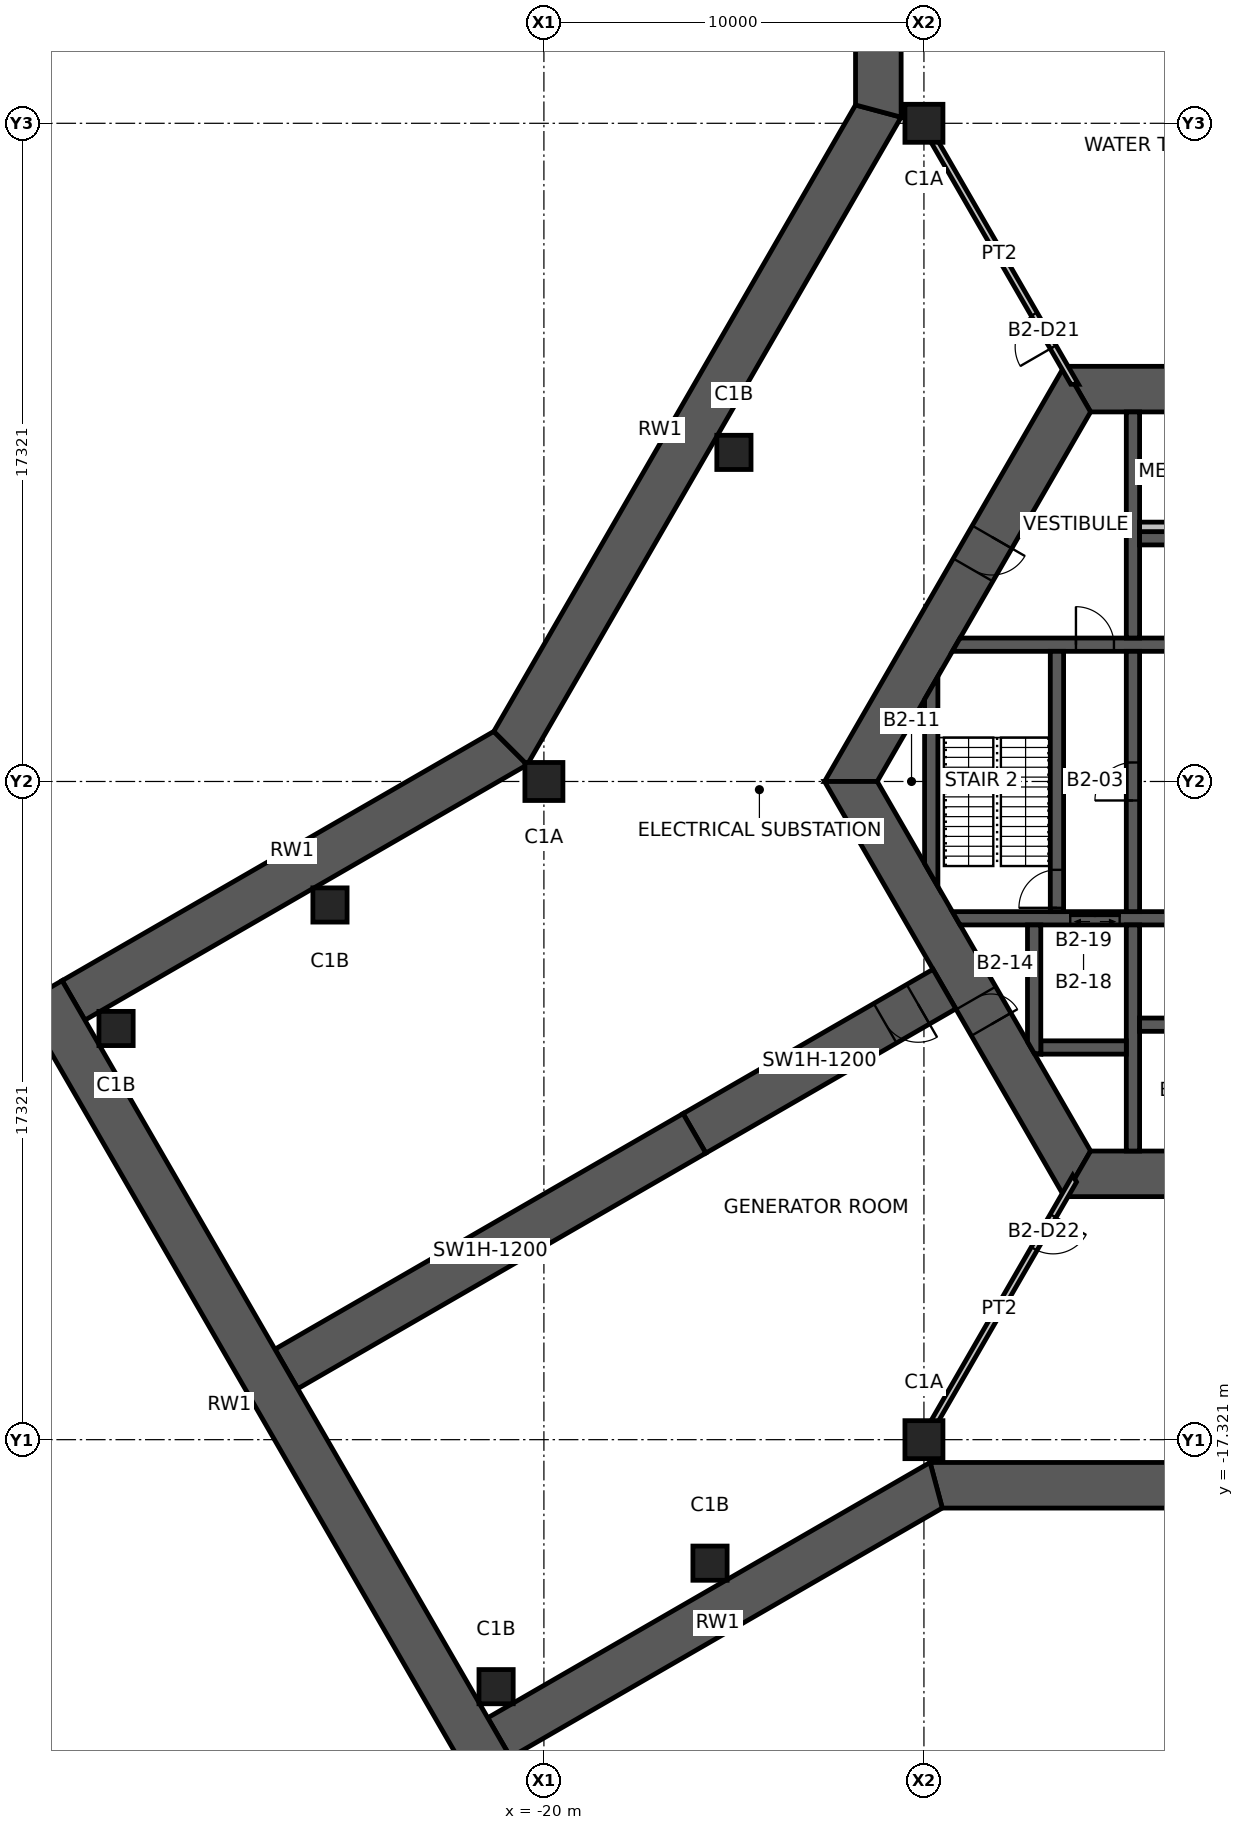
"""IFC4 building model, lengths in metres.
Left out: names, types, materials, properties, quantities, classifications, styles, units other than length and angle.
Written with IfcOpenShell. Run it as: python <this file> out.ifc"""

import sys

from ifc_helpers import new_model, si_unit, direction, frame, frame_2d, origin, origin_2d, place, context, subcontext, project, spatial, polyline, rectangle, hollow_rectangle, outline, extrude, element, fill, save


model = new_model("IFC4")
c1 = context("Model", 3, precision=1e-05, world=origin(), true_north=direction((0.0, 1.0)))
c2 = subcontext(c1, "Body", "Model", "MODEL_VIEW")
j1 = project(units=[si_unit("LENGTHUNIT", "METRE"), si_unit("PLANEANGLEUNIT", "RADIAN")], contexts=[c1])
p1 = place(None, origin())
s1 = spatial("IfcSite", under=j1, at=p1, CompositionType="ELEMENT")
p2 = place(p1, origin())
s2 = spatial("IfcBuilding", under=s1, at=p2, CompositionType="ELEMENT")
p3 = place(p2, frame((0.0, 0.0, -10.0)))
s3 = spatial("IfcBuildingStorey", under=s2, at=p3, CompositionType="ELEMENT", Elevation=-10.0)
for number, where, z_axis, x_axis in (
    (1, (-10.0, 17.321, -1.2), (0.0, 0.0, 1.0), (1.0, 0.0, 0.0)),
    (2, (-20.0, 0.0, -1.2), (0.0, 0.0, 1.0), (1.0, 0.0, 0.0)),
    (3, (-10.0, -17.321, -1.2), (0.0, 0.0, 1.0), (1.0, 0.0, 0.0)),
):
    element("IfcColumn", number, at=place(p3, frame(where, z_axis=z_axis, x_axis=x_axis)), inside=s3, PredefinedType="COLUMN", context=c2, shape_type="SweptSolid", body=[
        extrude(hollow_rectangle(XDim=1.0, YDim=1.0, WallThickness=0.06, at=origin_2d()), origin(), (0.0, 0.0, 1.0), 6.2),
    ])
for number, where, z_axis, x_axis in (
    (4, (-15.0, 8.66, -1.2), (0.0, 0.0, 1.0), (1.0, 0.0, 0.0)),
    (5, (-25.629, -3.25, -1.2), (0.0, 0.0, 1.0), (1.0, 0.0, 0.0)),
    (6, (-31.258, -6.5, -1.2), (0.0, 0.0, 1.0), (1.0, 0.0, 0.0)),
    (7, (-15.629, -20.571, -1.2), (0.0, 0.0, 1.0), (1.0, 0.0, 0.0)),
    (8, (-21.258, -23.821, -1.2), (0.0, 0.0, 1.0), (1.0, 0.0, 0.0)),
):
    element("IfcColumn", number, at=place(p3, frame(where, z_axis=z_axis, x_axis=x_axis)), inside=s3, PredefinedType="COLUMN", context=c2, shape_type="SweptSolid", body=[
        extrude(hollow_rectangle(XDim=0.9, YDim=0.9, WallThickness=0.05, at=origin_2d()), origin(), (0.0, 0.0, 1.0), 6.2),
    ])
p4 = place(p3, frame((5.961, 10.325, 0.0), z_axis=(0.0, 0.0, 1.0), x_axis=(-1.0, 0.0, 0.0)))
e9 = element("IfcWall", 9, at=p4, inside=s3, PredefinedType="SHEAR", context=c2, shape_type="SweptSolid", body=[
    extrude(outline(polyline([(-0.346, -0.6), (4.574, -0.6), (5.374, -0.6), (6.549, -0.6), (7.349, -0.6), (12.269, -0.6), (11.576, 0.6), (7.349, 0.6), (6.549, 0.6), (5.374, 0.6), (4.574, 0.6), (0.346, 0.6), (-0.346, -0.6)])), origin(), (0.0, 0.0, 1.0), 5.0),
])
p5 = place(p4, frame((6.549, 0.0, 0.0)))
e10 = element("IfcOpeningElement", 10, at=p5, cuts=e9, PredefinedType="OPENING", context=c2, shape_type="SweptSolid", body=[
    extrude(rectangle(XDim=0.8, YDim=2.1, at=frame_2d((0.4, 1.05))), frame((0.0, 0.61, 0.0), z_axis=(0.0, -1.0, 0.0), x_axis=(1.0, 0.0, 0.0)), (0.0, 0.0, 1.0), 1.22),
])
p6 = place(p4, frame((4.574, 0.0, 0.0)))
e11 = element("IfcOpeningElement", 11, at=p6, cuts=e9, PredefinedType="OPENING", context=c2, shape_type="SweptSolid", body=[
    extrude(rectangle(XDim=0.8, YDim=2.1, at=frame_2d((0.4, 1.05))), frame((0.0, 0.61, 0.0), z_axis=(0.0, -1.0, 0.0), x_axis=(1.0, 0.0, 0.0)), (0.0, 0.0, 1.0), 1.22),
])
p7 = place(p3, frame((-5.961, 10.325, 0.0), z_axis=(0.0, 0.0, 1.0), x_axis=(-0.500004296715, -0.866022923061, 0.0)))
e12 = element("IfcWall", 12, at=p7, inside=s3, PredefinedType="SHEAR", context=c2, shape_type="SweptSolid", body=[
    extrude(outline(polyline([(-0.346, -0.6), (4.494, -0.6), (5.494, -0.6), (12.269, -0.6), (11.576, 0.6), (5.494, 0.6), (4.494, 0.6), (0.346, 0.6), (-0.346, -0.6)])), origin(), (0.0, 0.0, 1.0), 5.0),
])
p8 = place(p7, frame((4.494, 0.0, 0.0)))
e13 = element("IfcOpeningElement", 13, at=p8, cuts=e12, PredefinedType="OPENING", context=c2, shape_type="SweptSolid", body=[
    extrude(rectangle(XDim=1.0, YDim=2.1, at=frame_2d((0.5, 1.05))), frame((0.0, 0.61, 0.0), z_axis=(0.0, -1.0, 0.0), x_axis=(1.0, 0.0, 0.0)), (0.0, 0.0, 1.0), 1.22),
])
p9 = place(p3, frame((-11.922, 0.0, 0.0), z_axis=(0.0, 0.0, 1.0), x_axis=(0.500004296715, -0.866022923061, 0.0)))
e14 = element("IfcWall", 14, at=p9, inside=s3, PredefinedType="SHEAR", context=c2, shape_type="SweptSolid", body=[
    extrude(outline(polyline([(-0.346, -0.6), (6.581, -0.6), (7.381, -0.6), (12.269, -0.6), (11.576, 0.6), (7.381, 0.6), (6.581, 0.6), (0.346, 0.6), (-0.346, -0.6)])), origin(), (0.0, 0.0, 1.0), 5.0),
])
p10 = place(p9, frame((6.581, 0.0, 0.0)))
e15 = element("IfcOpeningElement", 15, at=p10, cuts=e14, PredefinedType="OPENING", context=c2, shape_type="SweptSolid", body=[
    extrude(rectangle(XDim=0.8, YDim=2.1, at=frame_2d((0.4, 1.05))), frame((0.0, 0.61, 0.0), z_axis=(0.0, -1.0, 0.0), x_axis=(1.0, 0.0, 0.0)), (0.0, 0.0, 1.0), 1.22),
])
p11 = place(p3, frame((-5.961, -10.325, 0.0), z_axis=(0.0, 0.0, 1.0), x_axis=(1.0, 0.0, 0.0)))
e16 = element("IfcWall", 16, at=p11, inside=s3, PredefinedType="SHEAR", context=c2, shape_type="SweptSolid", body=[
    extrude(outline(polyline([(-0.346, -0.6), (5.461, -0.6), (6.461, -0.6), (12.269, -0.6), (11.576, 0.6), (6.461, 0.6), (5.461, 0.6), (0.346, 0.6), (-0.346, -0.6)])), origin(), (0.0, 0.0, 1.0), 5.0),
])
p12 = place(p11, frame((5.461, 0.0, 0.0)))
e17 = element("IfcOpeningElement", 17, at=p12, cuts=e16, PredefinedType="OPENING", context=c2, shape_type="SweptSolid", body=[
    extrude(rectangle(XDim=1.0, YDim=2.1, at=frame_2d((0.5, 1.05))), frame((0.0, 0.61, 0.0), z_axis=(0.0, -1.0, 0.0), x_axis=(1.0, 0.0, 0.0)), (0.0, 0.0, 1.0), 1.22),
])
p13 = place(p3, frame((-9.461, -5.462, 0.0), z_axis=(0.0, 0.0, 1.0), x_axis=(-0.866019116917, -0.500010889016, 0.0)))
e18 = element("IfcWall", 18, at=p13, inside=s3, PredefinedType="SHEAR", context=c2, shape_type="SweptSolid", body=[
    extrude(rectangle(XDim=7.595, YDim=1.2, at=frame_2d((3.798, 0.0))), origin(), (0.0, 0.0, 1.0), 5.0),
])
p14 = place(p13, frame((0.8, 0.0, 0.0)))
e19 = element("IfcOpeningElement", 19, at=p14, cuts=e18, PredefinedType="OPENING", context=c2, shape_type="SweptSolid", body=[
    extrude(rectangle(XDim=1.0, YDim=2.1, at=frame_2d((0.5, 1.05))), frame((0.0, 0.61, 0.0), z_axis=(0.0, -1.0, 0.0), x_axis=(1.0, 0.0, 0.0)), (0.0, 0.0, 1.0), 1.22),
])
p15 = place(p3, frame((-16.039, -9.26, 0.0), z_axis=(0.0, 0.0, 1.0), x_axis=(-0.866023285932, -0.50000366821, 0.0)))
e20 = element("IfcWall", 20, at=p15, inside=s3, PredefinedType="SHEAR", context=c2, shape_type="SweptSolid", body=[
    extrude(rectangle(XDim=12.4, YDim=1.2, at=frame_2d((6.2, 0.0))), origin(), (0.0, 0.0, 1.0), 5.0),
])
p16 = place(p3, frame((-32.378, -5.761, 0.0), z_axis=(0.0, 0.0, 1.0), x_axis=(0.866028209229, 0.499995140796, 0.0)))
e21 = element("IfcWall", 21, at=p16, inside=s3, PredefinedType="SOLIDWALL", context=c2, shape_type="SweptSolid", body=[
    extrude(outline(polyline([(0.0, -0.6), (13.439, -0.6), (13.118, 0.6), (0.0, 0.6), (0.0, -0.6)])), origin(), (0.0, 0.0, 1.0), 5.0),
])
p17 = place(p3, frame((-20.878, 0.878, 0.0), z_axis=(0.0, 0.0, 1.0), x_axis=(0.499998307868, 0.866026380735, 0.0)))
e22 = element("IfcWall", 22, at=p17, inside=s3, PredefinedType="SOLIDWALL", context=c2, shape_type="SweptSolid", body=[
    extrude(outline(polyline([(-0.161, -0.6), (19.518, -0.6), (19.196, 0.6), (0.161, 0.6), (-0.161, -0.6)])), origin(), (0.0, 0.0, 1.0), 5.0),
])
p18 = place(p3, frame((-11.2, 17.642, 0.0), z_axis=(0.0, 0.0, 1.0), x_axis=(0.0, 1.0, 0.0)))
e23 = element("IfcWall", 23, at=p18, inside=s3, PredefinedType="SOLIDWALL", context=c2, shape_type="SweptSolid", body=[
    extrude(outline(polyline([(-0.161, -0.6), (13.278, -0.6), (13.278, 0.6), (0.161, 0.6), (-0.161, -0.6)])), origin(), (0.0, 0.0, 1.0), 5.0),
])
p19 = place(p3, frame((9.678, -18.521, 0.0), z_axis=(0.0, 0.0, 1.0), x_axis=(-1.0, 0.0, 0.0)))
e24 = element("IfcWall", 24, at=p19, inside=s3, PredefinedType="SOLIDWALL", context=c2, shape_type="SweptSolid", body=[
    extrude(outline(polyline([(-0.161, -0.6), (19.518, -0.6), (19.196, 0.6), (0.161, 0.6), (-0.161, -0.6)])), origin(), (0.0, 0.0, 1.0), 5.0),
])
p20 = place(p3, frame((-9.678, -18.521, 0.0), z_axis=(0.0, 0.0, 1.0), x_axis=(-0.866028209229, -0.499995140796, 0.0)))
e25 = element("IfcWall", 25, at=p20, inside=s3, PredefinedType="SOLIDWALL", context=c2, shape_type="SweptSolid", body=[
    extrude(outline(polyline([(-0.161, -0.6), (13.279, -0.6), (13.279, 0.6), (0.161, 0.6), (-0.161, -0.6)])), origin(), (0.0, 0.0, 1.0), 5.0),
])
p21 = place(p3, frame((-21.397, -25.979, 0.0), z_axis=(0.0, 0.0, 1.0), x_axis=(-0.500005427746, 0.866022270051, 0.0)))
e26 = element("IfcWall", 26, at=p21, inside=s3, PredefinedType="SOLIDWALL", context=c2, shape_type="SweptSolid", body=[
    extrude(rectangle(XDim=23.6, YDim=1.2, at=frame_2d((11.8, 0.0))), origin(), (0.0, 0.0, 1.0), 5.0),
])
p22 = place(p3, frame((-9.151, 3.6, 0.0), z_axis=(0.0, 0.0, 1.0), x_axis=(1.0, 0.0, 0.0)))
e27 = element("IfcWall", 27, at=p22, inside=s3, PredefinedType="SHEAR", context=c2, shape_type="SweptSolid", body=[
    extrude(outline(polyline([(-0.101, -0.175), (3.151, -0.175), (4.151, -0.175), (7.726, -0.175), (7.726, 0.175), (4.151, 0.175), (3.151, 0.175), (0.101, 0.175), (-0.101, -0.175)])), origin(), (0.0, 0.0, 1.0), 5.0),
])
p23 = place(p22, frame((3.151, 0.0, 0.0)))
e28 = element("IfcOpeningElement", 28, at=p23, cuts=e27, PredefinedType="OPENING", context=c2, shape_type="SweptSolid", body=[
    extrude(rectangle(XDim=1.0, YDim=2.1, at=frame_2d((0.5, 1.05))), frame((0.0, 0.185, 0.0), z_axis=(0.0, -1.0, 0.0), x_axis=(1.0, 0.0, 0.0)), (0.0, 0.0, 1.0), 0.37),
])
p24 = place(p3, frame((-9.151, -3.6, 0.0), z_axis=(0.0, 0.0, 1.0), x_axis=(1.0, 0.0, 0.0)))
e29 = element("IfcWall", 29, at=p24, inside=s3, PredefinedType="SHEAR", context=c2, shape_type="SweptSolid", body=[
    extrude(outline(polyline([(0.101, -0.175), (3.001, -0.175), (4.301, -0.175), (7.726, -0.175), (7.726, 0.175), (4.301, 0.175), (3.001, 0.175), (-0.101, 0.175), (0.101, -0.175)])), origin(), (0.0, 0.0, 1.0), 5.0),
])
p25 = place(p24, frame((3.001, 0.0, 0.0)))
e30 = element("IfcOpeningElement", 30, at=p25, cuts=e29, PredefinedType="OPENING", context=c2, shape_type="SweptSolid", body=[
    extrude(rectangle(XDim=1.3, YDim=2.1, at=frame_2d((0.65, 1.05))), frame((0.0, 0.185, 0.0), z_axis=(0.0, -1.0, 0.0), x_axis=(1.0, 0.0, 0.0)), (0.0, 0.0, 1.0), 0.37),
])
p26 = place(p3, frame((-4.5, -3.425, 0.0), z_axis=(0.0, 0.0, 1.0), x_axis=(0.0, 1.0, 0.0)))
e31 = element("IfcWall", 31, at=p26, inside=s3, PredefinedType="SHEAR", context=c2, shape_type="SweptSolid", body=[
    extrude(rectangle(XDim=6.85, YDim=0.35, at=frame_2d((3.425, 0.0))), origin(), (0.0, 0.0, 1.0), 5.0),
])
p27 = place(p26, frame((2.925, 0.0, 0.0)))
e32 = element("IfcOpeningElement", 32, at=p27, cuts=e31, PredefinedType="OPENING", context=c2, shape_type="SweptSolid", body=[
    extrude(rectangle(XDim=1.0, YDim=2.1, at=frame_2d((0.5, 1.05))), frame((0.0, 0.185, 0.0), z_axis=(0.0, -1.0, 0.0), x_axis=(1.0, 0.0, 0.0)), (0.0, 0.0, 1.0), 0.37),
])
p28 = place(p3, frame((-6.5, -3.425, 0.0), z_axis=(0.0, 0.0, 1.0), x_axis=(0.0, 1.0, 0.0)))
e33 = element("IfcWall", 33, at=p28, inside=s3, PredefinedType="SHEAR", context=c2, shape_type="SweptSolid", body=[
    extrude(rectangle(XDim=6.85, YDim=0.35, at=frame_2d((3.425, 0.0))), origin(), (0.0, 0.0, 1.0), 5.0),
])
p29 = place(p28, frame((0.1, 0.0, 0.0)))
e34 = element("IfcOpeningElement", 34, at=p29, cuts=e33, PredefinedType="OPENING", context=c2, shape_type="SweptSolid", body=[
    extrude(rectangle(XDim=1.0, YDim=2.1, at=frame_2d((0.5, 1.05))), frame((0.0, 0.185, 0.0), z_axis=(0.0, -1.0, 0.0), x_axis=(1.0, 0.0, 0.0)), (0.0, 0.0, 1.0), 0.37),
])
for number, where, z_axis, x_axis in (
    (35, (-4.5, 3.775, 0.0), (0.0, 0.0, 1.0), (0.0, 1.0, 0.0)),
    (36, (-4.5, -3.775, 0.0), (0.0, 0.0, 1.0), (0.0, -1.0, 0.0)),
):
    element("IfcWall", number, at=place(p3, frame(where, z_axis=z_axis, x_axis=x_axis)), inside=s3, PredefinedType="SHEAR", context=c2, shape_type="SweptSolid", body=[
        extrude(rectangle(XDim=5.95, YDim=0.35, at=frame_2d((2.975, 0.0))), origin(), (0.0, 0.0, 1.0), 5.0),
    ])
for number, where, z_axis, x_axis in (
    (37, (-4.325, 6.4, 0.0), (0.0, 0.0, 1.0), (1.0, 0.0, 0.0)),
    (38, (-4.325, -6.4, 0.0), (0.0, 0.0, 1.0), (1.0, 0.0, 0.0)),
):
    element("IfcWall", number, at=place(p3, frame(where, z_axis=z_axis, x_axis=x_axis)), inside=s3, PredefinedType="SHEAR", context=c2, shape_type="SweptSolid", body=[
        extrude(rectangle(XDim=2.55, YDim=0.35, at=frame_2d((1.275, 0.0))), origin(), (0.0, 0.0, 1.0), 5.0),
    ])
p30 = place(p3, frame((-6.925, -7.0, 0.0), z_axis=(0.0, 0.0, 1.0), x_axis=(1.0, 0.0, 0.0)))
e39 = element("IfcWall", 39, at=p30, inside=s3, PredefinedType="SHEAR", context=c2, shape_type="SweptSolid", body=[
    extrude(rectangle(XDim=2.25, YDim=0.35, at=frame_2d((1.125, 0.0))), origin(), (0.0, 0.0, 1.0), 5.0),
])
p31 = place(p3, frame((-7.1, -3.775, 0.0), z_axis=(0.0, 0.0, 1.0), x_axis=(0.0, -1.0, 0.0)))
e40 = element("IfcWall", 40, at=p31, inside=s3, PredefinedType="SHEAR", context=c2, shape_type="SweptSolid", body=[
    extrude(outline(polyline([(0.0, -0.175), (3.074, -0.175), (3.377, 0.0), (3.4, 0.175), (0.0, 0.175), (0.0, -0.175)])), origin(), (0.0, 0.0, 1.0), 5.0),
])
p32 = place(p3, frame((-9.808, -2.462, 0.0), z_axis=(0.0, 0.0, 1.0), x_axis=(0.0, 1.0, 0.0)))
e41 = element("IfcWall", 41, at=p32, inside=s3, PredefinedType="SHEAR", context=c2, shape_type="SweptSolid", body=[
    extrude(outline(polyline([(-0.303, -0.175), (5.228, -0.175), (4.621, 0.175), (0.303, 0.175), (-0.303, -0.175)])), origin(), (0.0, 0.0, 1.0), 5.0),
])
p33 = place(p3, frame((-4.325, 6.7, 0.0), z_axis=(0.0, 0.0, 1.0), x_axis=(1.0, 0.0, 0.0)))
e42 = element("IfcWall", 42, at=p33, inside=s3, PredefinedType="PLUMBINGWALL", context=c2, shape_type="SweptSolid", body=[
    extrude(rectangle(XDim=2.55, YDim=0.25, at=frame_2d((1.275, 0.0))), origin(), (0.0, 0.0, 1.0), 5.0),
])
p34 = place(p3, frame((-6.035, 10.453, 0.0), z_axis=(0.0, 0.0, 1.0), x_axis=(-0.499993402427, 0.866029212861, 0.0)))
e43 = element("IfcWall", 43, at=p34, inside=s3, PredefinedType="PARTITIONING", context=c2, shape_type="SweptSolid", body=[
    extrude(outline(polyline([(-0.051, -0.087), (1.129, -0.087), (2.129, -0.087), (7.93, -0.087), (7.93, 0.087), (2.129, 0.087), (1.129, 0.087), (0.051, 0.087), (-0.051, -0.087)])), origin(), (0.0, 0.0, 1.0), 3.85),
])
p35 = place(p34, frame((1.129, 0.0, 0.0)))
e44 = element("IfcOpeningElement", 44, at=p35, cuts=e43, PredefinedType="OPENING", context=c2, shape_type="SweptSolid", body=[
    extrude(rectangle(XDim=1.0, YDim=2.1, at=frame_2d((0.5, 1.05))), frame((0.0, 0.098, 0.0), z_axis=(0.0, -1.0, 0.0), x_axis=(1.0, 0.0, 0.0)), (0.0, 0.0, 1.0), 0.195),
])
p36 = place(p3, frame((-6.035, -10.453, 0.0), z_axis=(0.0, 0.0, 1.0), x_axis=(-0.499993402427, -0.866029212861, 0.0)))
e45 = element("IfcWall", 45, at=p36, inside=s3, PredefinedType="PARTITIONING", context=c2, shape_type="SweptSolid", body=[
    extrude(outline(polyline([(-0.051, -0.087), (1.129, -0.087), (2.129, -0.087), (7.93, -0.087), (7.93, 0.087), (2.129, 0.087), (1.129, 0.087), (0.051, 0.087), (-0.051, -0.087)])), origin(), (0.0, 0.0, 1.0), 3.85),
])
p37 = place(p36, frame((1.129, 0.0, 0.0)))
e46 = element("IfcOpeningElement", 46, at=p37, cuts=e45, PredefinedType="OPENING", context=c2, shape_type="SweptSolid", body=[
    extrude(rectangle(XDim=1.0, YDim=2.1, at=frame_2d((0.5, 1.05))), frame((0.0, 0.098, 0.0), z_axis=(0.0, -1.0, 0.0), x_axis=(1.0, 0.0, 0.0)), (0.0, 0.0, 1.0), 0.195),
])
p38 = place(p10, origin())
e47 = element("IfcDoor", 47, at=p38, inside=s3, OperationType="SINGLE_SWING_RIGHT", PredefinedType="DOOR", context=c2, shape_type="SweptSolid", body=[
    extrude(rectangle(XDim=0.8, YDim=2.1, at=frame_2d((0.4, 1.05))), frame((0.0, 0.025, 0.0), z_axis=(0.0, -1.0, 0.0), x_axis=(1.0, 0.0, 0.0)), (0.0, 0.0, 1.0), 0.05),
])
fill(e15, e47)
p39 = place(p8, origin())
e48 = element("IfcDoor", 48, at=p39, inside=s3, OperationType="SINGLE_SWING_LEFT", PredefinedType="DOOR", context=c2, shape_type="SweptSolid", body=[
    extrude(rectangle(XDim=1.0, YDim=2.1, at=frame_2d((0.5, 1.05))), frame((0.0, 0.025, 0.0), z_axis=(0.0, -1.0, 0.0), x_axis=(1.0, 0.0, 0.0)), (0.0, 0.0, 1.0), 0.05),
])
fill(e13, e48)
p40 = place(p27, origin())
e49 = element("IfcDoor", 49, at=p40, inside=s3, OperationType="SINGLE_SWING_LEFT", PredefinedType="DOOR", context=c2, shape_type="SweptSolid", body=[
    extrude(rectangle(XDim=1.0, YDim=2.1, at=frame_2d((0.5, 1.05))), frame((0.0, 0.025, 0.0), z_axis=(0.0, -1.0, 0.0), x_axis=(1.0, 0.0, 0.0)), (0.0, 0.0, 1.0), 0.05),
])
fill(e32, e49)
p41 = place(p29, origin())
e50 = element("IfcDoor", 50, at=p41, inside=s3, OperationType="SINGLE_SWING_LEFT", PredefinedType="DOOR", context=c2, shape_type="SweptSolid", body=[
    extrude(rectangle(XDim=1.0, YDim=2.1, at=frame_2d((0.5, 1.05))), frame((0.0, 0.025, 0.0), z_axis=(0.0, -1.0, 0.0), x_axis=(1.0, 0.0, 0.0)), (0.0, 0.0, 1.0), 0.05),
])
fill(e34, e50)
p42 = place(p23, origin())
e51 = element("IfcDoor", 51, at=p42, inside=s3, OperationType="SINGLE_SWING_LEFT", PredefinedType="DOOR", context=c2, shape_type="SweptSolid", body=[
    extrude(rectangle(XDim=1.0, YDim=2.1, at=frame_2d((0.5, 1.05))), frame((0.0, 0.025, 0.0), z_axis=(0.0, -1.0, 0.0), x_axis=(1.0, 0.0, 0.0)), (0.0, 0.0, 1.0), 0.05),
])
fill(e28, e51)
p43 = place(p14, origin())
e52 = element("IfcDoor", 52, at=p43, inside=s3, OperationType="SINGLE_SWING_LEFT", PredefinedType="DOOR", context=c2, shape_type="SweptSolid", body=[
    extrude(rectangle(XDim=1.0, YDim=2.1, at=frame_2d((0.5, 1.05))), frame((0.0, 0.025, 0.0), z_axis=(0.0, -1.0, 0.0), x_axis=(1.0, 0.0, 0.0)), (0.0, 0.0, 1.0), 0.05),
])
fill(e19, e52)
p44 = place(p35, origin())
e53 = element("IfcDoor", 53, at=p44, inside=s3, OperationType="SINGLE_SWING_LEFT", PredefinedType="DOOR", context=c2, shape_type="SweptSolid", body=[
    extrude(rectangle(XDim=1.0, YDim=2.1, at=frame_2d((0.5, 1.05))), frame((0.0, 0.025, 0.0), z_axis=(0.0, -1.0, 0.0), x_axis=(1.0, 0.0, 0.0)), (0.0, 0.0, 1.0), 0.05),
])
fill(e44, e53)
p45 = place(p37, origin())
e54 = element("IfcDoor", 54, at=p45, inside=s3, OperationType="SINGLE_SWING_LEFT", PredefinedType="DOOR", context=c2, shape_type="SweptSolid", body=[
    extrude(rectangle(XDim=1.0, YDim=2.1, at=frame_2d((0.5, 1.05))), frame((0.0, 0.025, 0.0), z_axis=(0.0, -1.0, 0.0), x_axis=(1.0, 0.0, 0.0)), (0.0, 0.0, 1.0), 0.05),
])
fill(e46, e54)
p46 = place(p25, origin())
e55 = element("IfcDoor", 55, at=p46, inside=s3, OperationType="DOUBLE_DOOR_SLIDING", PredefinedType="DOOR", context=c2, shape_type="SweptSolid", body=[
    extrude(rectangle(XDim=1.3, YDim=2.1, at=frame_2d((0.65, 1.05))), frame((0.0, 0.025, 0.0), z_axis=(0.0, -1.0, 0.0), x_axis=(1.0, 0.0, 0.0)), (0.0, 0.0, 1.0), 0.05),
])
fill(e30, e55)
save(model, sys.argv[1])
